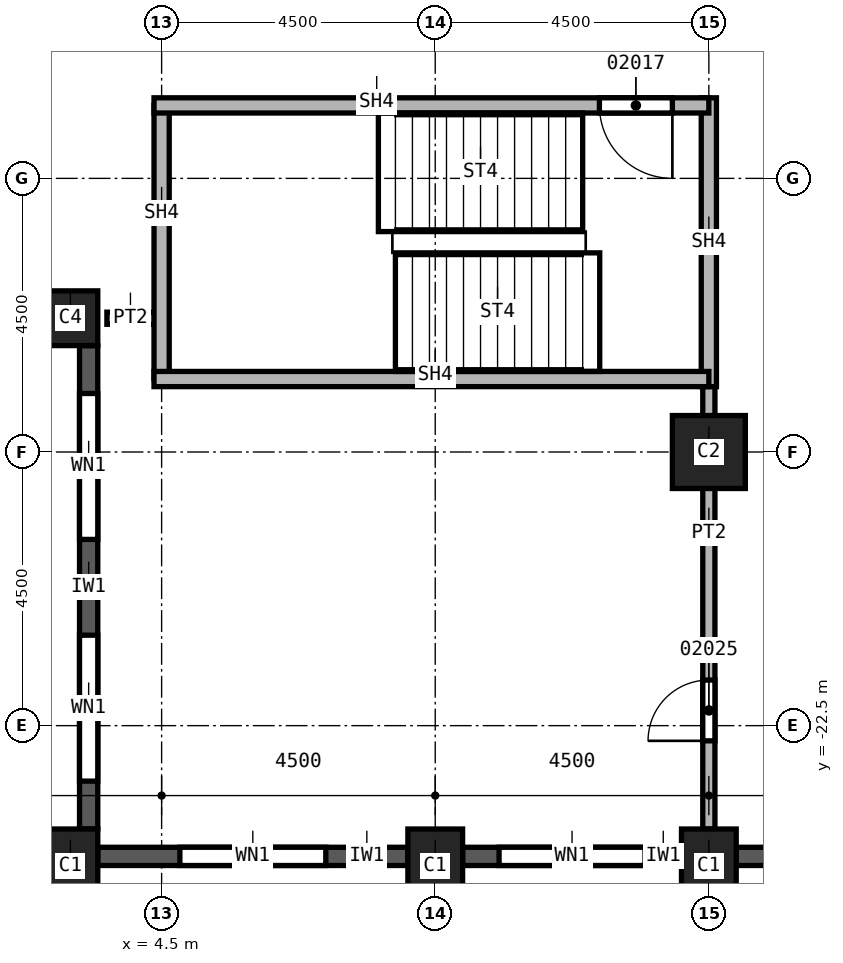
"""IFC4 building model, lengths in metres.
Left out: names, types, materials, properties, quantities, classifications, styles, units other than length and angle.
Written with IfcOpenShell. Run it as: python <this file> out.ifc"""

import sys

from ifc_helpers import new_model, si_unit, direction, frame, frame_2d, origin, origin_2d, place, context, subcontext, project, spatial, rectangle, extrude, element, fill, save


model = new_model("IFC4")
c1 = context("Model", 3, precision=1e-05, world=origin(), true_north=direction((0.0, 1.0)))
c2 = subcontext(c1, "Body", "Model", "MODEL_VIEW")
j1 = project(units=[si_unit("LENGTHUNIT", "METRE"), si_unit("PLANEANGLEUNIT", "RADIAN")], contexts=[c1])
p1 = place(None, origin())
s1 = spatial("IfcSite", under=j1, at=p1, CompositionType="ELEMENT")
p2 = place(p1, origin())
s2 = spatial("IfcBuilding", under=s1, at=p2, CompositionType="ELEMENT")
p3 = place(p2, frame((0.0, 0.0, 80.0)))
s3 = spatial("IfcBuildingStorey", under=s2, at=p3, CompositionType="ELEMENT", Elevation=80.0)
p4 = place(p3, frame((13.5, -18.0, 0.0), z_axis=(0.0, 0.0, 1.0), x_axis=(1.0, 0.0, 0.0)))
e1 = element("IfcColumn", 1, at=p4, inside=s3, PredefinedType="COLUMN", context=c2, shape_type="SweptSolid", body=[
    extrude(rectangle(XDim=1.2, YDim=1.2, at=origin_2d()), origin(), (0.0, 0.0, 1.0), 3.7),
])
for number, where, z_axis, x_axis in (
    (2, (3.0, -24.8, 0.0), (0.0, 0.0, 1.0), (1.0, 0.0, 0.0)),
    (3, (9.0, -24.8, 0.0), (0.0, 0.0, 1.0), (1.0, 0.0, 0.0)),
    (4, (13.5, -24.8, 0.0), (0.0, 0.0, 1.0), (1.0, 0.0, 0.0)),
):
    element("IfcColumn", number, at=place(p3, frame(where, z_axis=z_axis, x_axis=x_axis)), inside=s3, PredefinedType="COLUMN", context=c2, shape_type="SweptSolid", body=[
        extrude(rectangle(XDim=0.9, YDim=1.2, at=origin_2d()), origin(), (0.0, 0.0, 1.0), 3.7),
    ])
p5 = place(p3, frame((3.0, -15.8, 0.0), z_axis=(0.0, 0.0, 1.0), x_axis=(1.0, 0.0, 0.0)))
e5 = element("IfcColumn", 5, at=p5, inside=s3, PredefinedType="COLUMN", context=c2, shape_type="SweptSolid", body=[
    extrude(rectangle(XDim=0.9, YDim=0.9, at=origin_2d()), origin(), (0.0, 0.0, 1.0), 3.7),
])
p6 = place(p3, frame((3.3, -16.25, 0.0), z_axis=(0.0, 0.0, 1.0), x_axis=(0.0, -1.0, 0.0)))
e6 = element("IfcWall", 6, at=p6, inside=s3, PredefinedType="SOLIDWALL", context=c2, shape_type="SweptSolid", body=[
    extrude(rectangle(XDim=7.95, YDim=0.3, at=frame_2d((3.975, 0.0))), origin(), (0.0, 0.0, 1.0), 3.1),
])
p7 = place(p6, frame((0.788, 0.0, 0.8)))
e7 = element("IfcOpeningElement", 7, at=p7, cuts=e6, PredefinedType="OPENING", context=c2, shape_type="SweptSolid", body=[
    extrude(rectangle(XDim=2.4, YDim=1.95, at=frame_2d((1.2, 0.975))), frame((0.0, 0.15, 0.0), z_axis=(0.0, -1.0, 0.0), x_axis=(1.0, 0.0, 0.0)), (0.0, 0.0, 1.0), 0.3),
])
p8 = place(p6, frame((4.762, 0.0, 0.8)))
e8 = element("IfcOpeningElement", 8, at=p8, cuts=e6, PredefinedType="OPENING", context=c2, shape_type="SweptSolid", body=[
    extrude(rectangle(XDim=2.4, YDim=1.95, at=frame_2d((1.2, 0.975))), frame((0.0, 0.15, 0.0), z_axis=(0.0, -1.0, 0.0), x_axis=(1.0, 0.0, 0.0)), (0.0, 0.0, 1.0), 0.3),
])
p9 = place(p3, frame((3.45, -24.65, 0.0), z_axis=(0.0, 0.0, 1.0), x_axis=(1.0, 0.0, 0.0)))
e9 = element("IfcWall", 9, at=p9, inside=s3, PredefinedType="SOLIDWALL", context=c2, shape_type="SweptSolid", body=[
    extrude(rectangle(XDim=5.1, YDim=0.3, at=frame_2d((2.55, 0.0))), origin(), (0.0, 0.0, 1.0), 3.1),
])
p10 = place(p9, frame((1.35, 0.0, 0.8)))
e10 = element("IfcOpeningElement", 10, at=p10, cuts=e9, PredefinedType="OPENING", context=c2, shape_type="SweptSolid", body=[
    extrude(rectangle(XDim=2.4, YDim=1.95, at=frame_2d((1.2, 0.975))), frame((0.0, 0.15, 0.0), z_axis=(0.0, -1.0, 0.0), x_axis=(1.0, 0.0, 0.0)), (0.0, 0.0, 1.0), 0.3),
])
p11 = place(p3, frame((9.45, -24.65, 0.0), z_axis=(0.0, 0.0, 1.0), x_axis=(1.0, 0.0, 0.0)))
e11 = element("IfcWall", 11, at=p11, inside=s3, PredefinedType="SOLIDWALL", context=c2, shape_type="SweptSolid", body=[
    extrude(rectangle(XDim=3.6, YDim=0.3, at=frame_2d((1.8, 0.0))), origin(), (0.0, 0.0, 1.0), 3.1),
])
p12 = place(p11, frame((0.6, 0.0, 0.8)))
e12 = element("IfcOpeningElement", 12, at=p12, cuts=e11, PredefinedType="OPENING", context=c2, shape_type="SweptSolid", body=[
    extrude(rectangle(XDim=2.4, YDim=1.95, at=frame_2d((1.2, 0.975))), frame((0.0, 0.15, 0.0), z_axis=(0.0, -1.0, 0.0), x_axis=(1.0, 0.0, 0.0)), (0.0, 0.0, 1.0), 0.3),
])
p13 = place(p3, frame((13.95, -24.65, 0.0), z_axis=(0.0, 0.0, 1.0), x_axis=(1.0, 0.0, 0.0)))
e13 = element("IfcWall", 13, at=p13, inside=s3, PredefinedType="SOLIDWALL", context=c2, shape_type="SweptSolid", body=[
    extrude(rectangle(XDim=3.6, YDim=0.3, at=frame_2d((1.8, 0.0))), origin(), (0.0, 0.0, 1.0), 3.1),
])
p14 = place(p13, frame((0.625, 0.0, 0.8)))
e14 = element("IfcOpeningElement", 14, at=p14, cuts=e13, PredefinedType="OPENING", context=c2, shape_type="SweptSolid", body=[
    extrude(rectangle(XDim=0.6, YDim=1.95, at=frame_2d((0.3, 0.975))), frame((0.0, 0.15, 0.0), z_axis=(0.0, -1.0, 0.0), x_axis=(1.0, 0.0, 0.0)), (0.0, 0.0, 1.0), 0.3),
])
p15 = place(p13, frame((1.825, 0.0, 0.8)))
e15 = element("IfcOpeningElement", 15, at=p15, cuts=e13, PredefinedType="OPENING", context=c2, shape_type="SweptSolid", body=[
    extrude(rectangle(XDim=1.0, YDim=1.95, at=frame_2d((0.5, 0.975))), frame((0.0, 0.15, 0.0), z_axis=(0.0, -1.0, 0.0), x_axis=(1.0, 0.0, 0.0)), (0.0, 0.0, 1.0), 0.3),
])
p16 = place(p3, frame((4.5, -15.8, 0.0), z_axis=(0.0, 0.0, 1.0), x_axis=(-1.0, 0.0, 0.0)))
e16 = element("IfcWall", 16, at=p16, inside=s3, PredefinedType="PARTITIONING", context=c2, shape_type="SweptSolid", body=[
    extrude(rectangle(XDim=0.9, YDim=0.2, at=frame_2d((0.45, 0.0))), origin(), (0.0, 0.0, 1.0), 3.7),
])
p17 = place(p3, frame((13.5, -24.2, 0.0), z_axis=(0.0, 0.0, 1.0), x_axis=(0.0, 1.0, 0.0)))
e17 = element("IfcWall", 17, at=p17, inside=s3, PredefinedType="PARTITIONING", context=c2, shape_type="SweptSolid", body=[
    extrude(rectangle(XDim=7.525, YDim=0.2, at=frame_2d((3.762, 0.0))), origin(), (0.0, 0.0, 1.0), 3.7),
])
p18 = place(p17, frame((1.45, 0.0, 0.0)))
e18 = element("IfcOpeningElement", 18, at=p18, cuts=e17, PredefinedType="OPENING", context=c2, shape_type="SweptSolid", body=[
    extrude(rectangle(XDim=1.0, YDim=2.1, at=frame_2d((0.5, 1.05))), frame((0.0, 0.1, 0.0), z_axis=(0.0, -1.0, 0.0), x_axis=(1.0, 0.0, 0.0)), (0.0, 0.0, 1.0), 0.2),
])
p19 = place(p3, frame((4.5, -16.8, 0.0), z_axis=(0.0, 0.0, 1.0), x_axis=(0.0, 1.0, 0.0)))
e19 = element("IfcWall", 19, at=p19, inside=s3, PredefinedType="SOLIDWALL", context=c2, shape_type="SweptSolid", body=[
    extrude(rectangle(XDim=4.5, YDim=0.25, at=frame_2d((2.25, 0.0))), origin(), (0.0, 0.0, 1.0), 3.7),
])
p20 = place(p3, frame((13.5, -16.925, 0.0), z_axis=(0.0, 0.0, 1.0), x_axis=(0.0, 1.0, 0.0)))
e20 = element("IfcWall", 20, at=p20, inside=s3, PredefinedType="SOLIDWALL", context=c2, shape_type="SweptSolid", body=[
    extrude(rectangle(XDim=4.75, YDim=0.25, at=frame_2d((2.375, 0.0))), origin(), (0.0, 0.0, 1.0), 3.7),
])
p21 = place(p3, frame((13.5, -16.8, 0.0), z_axis=(0.0, 0.0, 1.0), x_axis=(-1.0, 0.0, 0.0)))
e21 = element("IfcWall", 21, at=p21, inside=s3, PredefinedType="SOLIDWALL", context=c2, shape_type="SweptSolid", body=[
    extrude(rectangle(XDim=9.125, YDim=0.25, at=frame_2d((4.562, 0.0))), origin(), (0.0, 0.0, 1.0), 3.7),
])
p22 = place(p3, frame((13.5, -12.3, 0.0), z_axis=(0.0, 0.0, 1.0), x_axis=(-1.0, 0.0, 0.0)))
e22 = element("IfcWall", 22, at=p22, inside=s3, PredefinedType="SOLIDWALL", context=c2, shape_type="SweptSolid", body=[
    extrude(rectangle(XDim=9.125, YDim=0.25, at=frame_2d((4.562, 0.0))), origin(), (0.0, 0.0, 1.0), 3.7),
])
p23 = place(p22, frame((0.6, 0.0, 0.0)))
e23 = element("IfcOpeningElement", 23, at=p23, cuts=e22, PredefinedType="OPENING", context=c2, shape_type="SweptSolid", body=[
    extrude(rectangle(XDim=1.2, YDim=2.1, at=frame_2d((0.6, 1.05))), frame((0.0, 0.125, 0.0), z_axis=(0.0, -1.0, 0.0), x_axis=(1.0, 0.0, 0.0)), (0.0, 0.0, 1.0), 0.25),
])
p24 = place(p7, origin())
e24 = element("IfcWindow", 24, at=p24, inside=s3, PartitioningType="SINGLE_PANEL", PredefinedType="WINDOW", context=c2, shape_type="SweptSolid", body=[
    extrude(rectangle(XDim=2.4, YDim=1.95, at=frame_2d((1.2, 0.975))), frame((0.0, 0.03, 0.0), z_axis=(0.0, -1.0, 0.0), x_axis=(1.0, 0.0, 0.0)), (0.0, 0.0, 1.0), 0.06),
])
fill(e7, e24)
p25 = place(p8, origin())
e25 = element("IfcWindow", 25, at=p25, inside=s3, PartitioningType="SINGLE_PANEL", PredefinedType="WINDOW", context=c2, shape_type="SweptSolid", body=[
    extrude(rectangle(XDim=2.4, YDim=1.95, at=frame_2d((1.2, 0.975))), frame((0.0, 0.03, 0.0), z_axis=(0.0, -1.0, 0.0), x_axis=(1.0, 0.0, 0.0)), (0.0, 0.0, 1.0), 0.06),
])
fill(e8, e25)
p26 = place(p10, origin())
e26 = element("IfcWindow", 26, at=p26, inside=s3, PartitioningType="SINGLE_PANEL", PredefinedType="WINDOW", context=c2, shape_type="SweptSolid", body=[
    extrude(rectangle(XDim=2.4, YDim=1.95, at=frame_2d((1.2, 0.975))), frame((0.0, 0.03, 0.0), z_axis=(0.0, -1.0, 0.0), x_axis=(1.0, 0.0, 0.0)), (0.0, 0.0, 1.0), 0.06),
])
fill(e10, e26)
p27 = place(p12, origin())
e27 = element("IfcWindow", 27, at=p27, inside=s3, PartitioningType="SINGLE_PANEL", PredefinedType="WINDOW", context=c2, shape_type="SweptSolid", body=[
    extrude(rectangle(XDim=2.4, YDim=1.95, at=frame_2d((1.2, 0.975))), frame((0.0, 0.03, 0.0), z_axis=(0.0, -1.0, 0.0), x_axis=(1.0, 0.0, 0.0)), (0.0, 0.0, 1.0), 0.06),
])
fill(e12, e27)
p28 = place(p23, origin())
e28 = element("IfcDoor", 28, at=p28, inside=s3, OperationType="SINGLE_SWING_RIGHT", PredefinedType="DOOR", context=c2, shape_type="SweptSolid", body=[
    extrude(rectangle(XDim=1.2, YDim=2.1, at=frame_2d((0.6, 1.05))), frame((0.0, 0.025, 0.0), z_axis=(0.0, -1.0, 0.0), x_axis=(1.0, 0.0, 0.0)), (0.0, 0.0, 1.0), 0.05),
])
fill(e23, e28)
p29 = place(p18, origin())
e29 = element("IfcDoor", 29, at=p29, inside=s3, OperationType="SINGLE_SWING_RIGHT", PredefinedType="DOOR", context=c2, shape_type="SweptSolid", body=[
    extrude(rectangle(XDim=1.0, YDim=2.1, at=frame_2d((0.5, 1.05))), frame((0.0, 0.025, 0.0), z_axis=(0.0, -1.0, 0.0), x_axis=(1.0, 0.0, 0.0)), (0.0, 0.0, 1.0), 0.05),
])
fill(e18, e29)
save(model, sys.argv[1])
